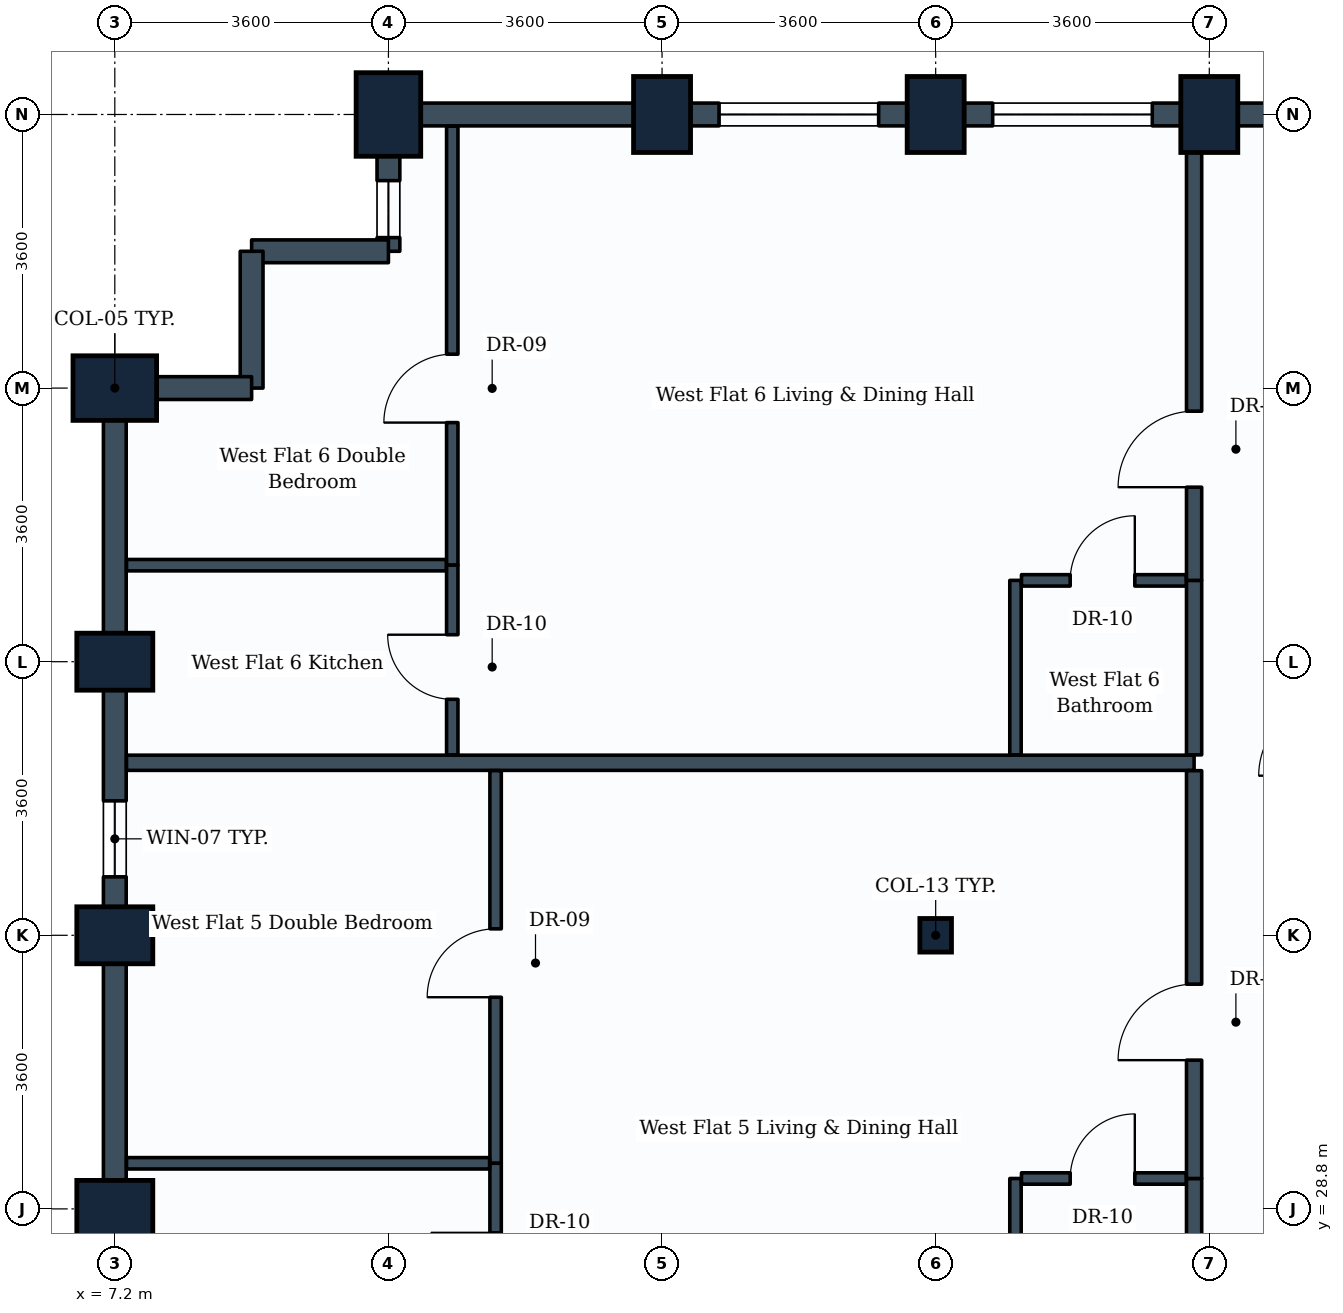
"""IFC4 building model, lengths in metres.
Left out: names, types, materials, properties, quantities, classifications, styles, units other than length and angle.
Written with IfcOpenShell. Run it as: python <this file> out.ifc"""

import sys

from ifc_helpers import new_model, si_unit, direction, frame, frame_2d, origin, origin_2d, place, context, subcontext, project, spatial, rectangle, i_section, extrude, element, fill, save


model = new_model("IFC4")
c1 = context("Model", 3, precision=1e-05, world=origin(), true_north=direction((0.0, 1.0)))
c2 = subcontext(c1, "Body", "Model", "MODEL_VIEW")
j1 = project(units=[si_unit("LENGTHUNIT", "METRE"), si_unit("PLANEANGLEUNIT", "RADIAN")], contexts=[c1])
p1 = place(None, origin())
s1 = spatial("IfcSite", under=j1, at=p1, CompositionType="ELEMENT")
p2 = place(p1, origin())
s2 = spatial("IfcBuilding", under=s1, at=p2, CompositionType="ELEMENT")
p3 = place(p2, frame((0.0, 0.0, 139.0)))
s3 = spatial("IfcBuildingStorey", under=s2, at=p3, CompositionType="ELEMENT", Elevation=139.0)
for number, where, z_axis, x_axis in (
    (1, (7.2, 28.8, 0.0), (0.0, 0.0, 1.0), (0.0, 1.0, 0.0)),
    (2, (7.2, 32.4, 0.0), (0.0, 0.0, 1.0), (0.0, 1.0, 0.0)),
    (3, (7.2, 36.0, 0.0), (0.0, 0.0, 1.0), (0.0, 1.0, 0.0)),
):
    element("IfcColumn", number, at=place(p3, frame(where, z_axis=z_axis, x_axis=x_axis)), inside=s3, PredefinedType="COLUMN", context=c2, shape_type="SweptSolid", body=[
        extrude(rectangle(XDim=0.75, YDim=1.0, at=origin_2d()), origin(), (0.0, 0.0, 1.0), 3.8),
    ])
for number, where, z_axis, x_axis in (
    (4, (7.2, 39.6, 0.0), (0.0, 0.0, 1.0), (0.0, 1.0, 0.0)),
    (5, (10.8, 43.2, 0.0), (0.0, 0.0, 1.0), (1.0, 0.0, 0.0)),
):
    element("IfcColumn", number, at=place(p3, frame(where, z_axis=z_axis, x_axis=x_axis)), inside=s3, PredefinedType="COLUMN", context=c2, shape_type="SweptSolid", body=[
        extrude(rectangle(XDim=0.85, YDim=1.1, at=origin_2d()), origin(), (0.0, 0.0, 1.0), 3.8),
    ])
p4 = place(p3, frame((14.4, 43.2, 0.0), z_axis=(0.0, 0.0, 1.0), x_axis=(1.0, 0.0, 0.0)))
e6 = element("IfcColumn", 6, at=p4, inside=s3, PredefinedType="COLUMN", context=c2, shape_type="SweptSolid", body=[
    extrude(rectangle(XDim=0.75, YDim=1.0, at=origin_2d()), origin(), (0.0, 0.0, 1.0), 3.8),
])
p5 = place(p3, frame((18.0, 32.4, 0.0), z_axis=(0.0, 0.0, 1.0), x_axis=(1.0, 0.0, 0.0)))
e7 = element("IfcColumn", 7, at=p5, inside=s3, PredefinedType="COLUMN", context=c2, shape_type="SweptSolid", body=[
    extrude(i_section(OverallWidth=0.416, OverallDepth=0.442, WebThickness=0.025, FlangeThickness=0.041, FilletRadius=0.015, at=origin_2d()), origin(), (0.0, 0.0, 1.0), 3.8),
])
for number, where, z_axis, x_axis in (
    (8, (18.0, 43.2, 0.0), (0.0, 0.0, 1.0), (1.0, 0.0, 0.0)),
    (9, (21.6, 43.2, 0.0), (0.0, 0.0, 1.0), (1.0, 0.0, 0.0)),
):
    element("IfcColumn", number, at=place(p3, frame(where, z_axis=z_axis, x_axis=x_axis)), inside=s3, PredefinedType="COLUMN", context=c2, shape_type="SweptSolid", body=[
        extrude(rectangle(XDim=0.75, YDim=1.0, at=origin_2d()), origin(), (0.0, 0.0, 1.0), 3.8),
    ])
p6 = place(p3, frame((21.6, 43.2, 0.0), z_axis=(0.0, 0.0, 1.0), x_axis=(1.0, 0.0, 0.0)))
e10 = element("IfcWall", 10, at=p6, inside=s3, PredefinedType="STANDARD", context=c2, shape_type="SweptSolid", body=[
    extrude(rectangle(XDim=3.6, YDim=0.3, at=frame_2d((1.8, 0.0))), origin(), (0.0, 0.0, 1.0), 2.93),
])
p7 = place(p3, frame((18.0, 43.2, 0.0), z_axis=(0.0, 0.0, 1.0), x_axis=(1.0, 0.0, 0.0)))
e11 = element("IfcWall", 11, at=p7, inside=s3, PredefinedType="STANDARD", context=c2, shape_type="SweptSolid", body=[
    extrude(rectangle(XDim=3.6, YDim=0.3, at=frame_2d((1.8, 0.0))), origin(), (0.0, 0.0, 1.0), 2.93),
])
p8 = place(p7, frame((0.75, 0.0, 0.85)))
e12 = element("IfcOpeningElement", 12, at=p8, cuts=e11, PredefinedType="OPENING", context=c2, shape_type="SweptSolid", body=[
    extrude(rectangle(XDim=2.1, YDim=1.35, at=frame_2d((1.05, 0.675))), frame((0.0, 0.16, 0.0), z_axis=(0.0, -1.0, 0.0), x_axis=(1.0, 0.0, 0.0)), (0.0, 0.0, 1.0), 0.32),
])
p9 = place(p3, frame((14.4, 43.2, 0.0), z_axis=(0.0, 0.0, 1.0), x_axis=(1.0, 0.0, 0.0)))
e13 = element("IfcWall", 13, at=p9, inside=s3, PredefinedType="STANDARD", context=c2, shape_type="SweptSolid", body=[
    extrude(rectangle(XDim=3.6, YDim=0.3, at=frame_2d((1.8, 0.0))), origin(), (0.0, 0.0, 1.0), 2.93),
])
p10 = place(p9, frame((0.75, 0.0, 0.85)))
e14 = element("IfcOpeningElement", 14, at=p10, cuts=e13, PredefinedType="OPENING", context=c2, shape_type="SweptSolid", body=[
    extrude(rectangle(XDim=2.1, YDim=1.35, at=frame_2d((1.05, 0.675))), frame((0.0, 0.16, 0.0), z_axis=(0.0, -1.0, 0.0), x_axis=(1.0, 0.0, 0.0)), (0.0, 0.0, 1.0), 0.32),
])
p11 = place(p3, frame((10.8, 43.2, 0.0), z_axis=(0.0, 0.0, 1.0), x_axis=(1.0, 0.0, 0.0)))
e15 = element("IfcWall", 15, at=p11, inside=s3, PredefinedType="STANDARD", context=c2, shape_type="SweptSolid", body=[
    extrude(rectangle(XDim=3.6, YDim=0.3, at=frame_2d((1.8, 0.0))), origin(), (0.0, 0.0, 1.0), 2.93),
])
p12 = place(p3, frame((10.8, 41.4, 0.0), z_axis=(0.0, 0.0, 1.0), x_axis=(0.0, 1.0, 0.0)))
e16 = element("IfcWall", 16, at=p12, inside=s3, PredefinedType="STANDARD", context=c2, shape_type="SweptSolid", body=[
    extrude(rectangle(XDim=1.8, YDim=0.3, at=frame_2d((0.9, 0.0))), origin(), (0.0, 0.0, 1.0), 2.93),
])
p13 = place(p12, frame((0.18, 0.0, 0.85)))
e17 = element("IfcOpeningElement", 17, at=p13, cuts=e16, PredefinedType="OPENING", context=c2, shape_type="SweptSolid", body=[
    extrude(rectangle(XDim=0.75, YDim=1.05, at=frame_2d((0.375, 0.525))), frame((0.0, 0.16, 0.0), z_axis=(0.0, -1.0, 0.0), x_axis=(1.0, 0.0, 0.0)), (0.0, 0.0, 1.0), 0.32),
])
p14 = place(p3, frame((9.0, 41.4, 0.0), z_axis=(0.0, 0.0, 1.0), x_axis=(1.0, 0.0, 0.0)))
e18 = element("IfcWall", 18, at=p14, inside=s3, PredefinedType="STANDARD", context=c2, shape_type="SweptSolid", body=[
    extrude(rectangle(XDim=1.8, YDim=0.3, at=frame_2d((0.9, 0.0))), origin(), (0.0, 0.0, 1.0), 3.535),
])
p15 = place(p3, frame((9.0, 39.6, 0.0), z_axis=(0.0, 0.0, 1.0), x_axis=(0.0, 1.0, 0.0)))
e19 = element("IfcWall", 19, at=p15, inside=s3, PredefinedType="STANDARD", context=c2, shape_type="SweptSolid", body=[
    extrude(rectangle(XDim=1.8, YDim=0.3, at=frame_2d((0.9, 0.0))), origin(), (0.0, 0.0, 1.0), 3.535),
])
p16 = place(p3, frame((7.2, 39.6, 0.0), z_axis=(0.0, 0.0, 1.0), x_axis=(1.0, 0.0, 0.0)))
e20 = element("IfcWall", 20, at=p16, inside=s3, PredefinedType="STANDARD", context=c2, shape_type="SweptSolid", body=[
    extrude(rectangle(XDim=1.8, YDim=0.3, at=frame_2d((0.9, 0.0))), origin(), (0.0, 0.0, 1.0), 2.93),
])
p17 = place(p3, frame((7.2, 36.0, 0.0), z_axis=(0.0, 0.0, 1.0), x_axis=(0.0, 1.0, 0.0)))
e21 = element("IfcWall", 21, at=p17, inside=s3, PredefinedType="STANDARD", context=c2, shape_type="SweptSolid", body=[
    extrude(rectangle(XDim=3.6, YDim=0.3, at=frame_2d((1.8, 0.0))), origin(), (0.0, 0.0, 1.0), 2.93),
])
p18 = place(p3, frame((7.2, 32.4, 0.0), z_axis=(0.0, 0.0, 1.0), x_axis=(0.0, 1.0, 0.0)))
e22 = element("IfcWall", 22, at=p18, inside=s3, PredefinedType="STANDARD", context=c2, shape_type="SweptSolid", body=[
    extrude(rectangle(XDim=3.6, YDim=0.3, at=frame_2d((1.8, 0.0))), origin(), (0.0, 0.0, 1.0), 2.93),
])
p19 = place(p18, frame((0.769, 0.0, 0.85)))
e23 = element("IfcOpeningElement", 23, at=p19, cuts=e22, PredefinedType="OPENING", context=c2, shape_type="SweptSolid", body=[
    extrude(rectangle(XDim=1.0, YDim=1.35, at=frame_2d((0.5, 0.675))), frame((0.0, 0.16, 0.0), z_axis=(0.0, -1.0, 0.0), x_axis=(1.0, 0.0, 0.0)), (0.0, 0.0, 1.0), 0.32),
])
p20 = place(p3, frame((7.2, 28.8, 0.0), z_axis=(0.0, 0.0, 1.0), x_axis=(0.0, 1.0, 0.0)))
e24 = element("IfcWall", 24, at=p20, inside=s3, PredefinedType="STANDARD", context=c2, shape_type="SweptSolid", body=[
    extrude(rectangle(XDim=3.6, YDim=0.3, at=frame_2d((1.8, 0.0))), origin(), (0.0, 0.0, 1.0), 2.93),
])
p21 = place(p3, frame((7.2, 25.2, 0.0), z_axis=(0.0, 0.0, 1.0), x_axis=(0.0, 1.0, 0.0)))
e25 = element("IfcWall", 25, at=p21, inside=s3, PredefinedType="STANDARD", context=c2, shape_type="SweptSolid", body=[
    extrude(rectangle(XDim=3.6, YDim=0.3, at=frame_2d((1.8, 0.0))), origin(), (0.0, 0.0, 1.0), 2.93),
])
p22 = place(p3, frame((7.354, 34.67, 0.0), z_axis=(0.0, 0.0, 1.0), x_axis=(1.0, 0.0, 0.0)))
e26 = element("IfcWall", 26, at=p22, inside=s3, PredefinedType="PARTITIONING", context=c2, shape_type="SweptSolid", body=[
    extrude(rectangle(XDim=14.046, YDim=0.2, at=frame_2d((7.023, 0.0))), origin(), (0.0, 0.0, 1.0), 2.93),
])
p23 = place(p3, frame((21.4, 26.904, 0.0), z_axis=(0.0, 0.0, 1.0), x_axis=(0.0, 1.0, 0.0)))
e27 = element("IfcWall", 27, at=p23, inside=s3, PredefinedType="PARTITIONING", context=c2, shape_type="SweptSolid", body=[
    extrude(rectangle(XDim=2.296, YDim=0.2, at=frame_2d((1.148, 0.0))), origin(), (0.0, 0.0, 1.0), 3.13),
])
p24 = place(p3, frame((19.05, 26.904, 0.0), z_axis=(0.0, 0.0, 1.0), x_axis=(0.0, 1.0, 0.0)))
e28 = element("IfcWall", 28, at=p24, inside=s3, PredefinedType="PARTITIONING", context=c2, shape_type="SweptSolid", body=[
    extrude(rectangle(XDim=2.296, YDim=0.15, at=frame_2d((1.148, 0.0))), origin(), (0.0, 0.0, 1.0), 3.17),
])
p25 = place(p3, frame((19.129, 29.2, 0.0), z_axis=(0.0, 0.0, 1.0), x_axis=(1.0, 0.0, 0.0)))
e29 = element("IfcWall", 29, at=p25, inside=s3, PredefinedType="PARTITIONING", context=c2, shape_type="SweptSolid", body=[
    extrude(rectangle(XDim=2.167, YDim=0.15, at=frame_2d((1.083, 0.0))), origin(), (0.0, 0.0, 1.0), 3.535),
])
p26 = place(p25, frame((0.641, 0.0, 0.0)))
e30 = element("IfcOpeningElement", 30, at=p26, cuts=e29, PredefinedType="OPENING", context=c2, shape_type="SweptSolid", body=[
    extrude(rectangle(XDim=0.85, YDim=2.1, at=frame_2d((0.425, 1.05))), frame((0.0, 0.085, 0.0), z_axis=(0.0, -1.0, 0.0), x_axis=(1.0, 0.0, 0.0)), (0.0, 0.0, 1.0), 0.17),
])
p27 = place(p3, frame((21.4, 29.2, 0.0), z_axis=(0.0, 0.0, 1.0), x_axis=(0.0, 1.0, 0.0)))
e31 = element("IfcWall", 31, at=p27, inside=s3, PredefinedType="PARTITIONING", context=c2, shape_type="SweptSolid", body=[
    extrude(rectangle(XDim=5.366, YDim=0.2, at=frame_2d((2.683, 0.0))), origin(), (0.0, 0.0, 1.0), 3.13),
])
p28 = place(p27, frame((1.557, 0.0, 0.0)))
e32 = element("IfcOpeningElement", 32, at=p28, cuts=e31, PredefinedType="OPENING", context=c2, shape_type="SweptSolid", body=[
    extrude(rectangle(XDim=1.0, YDim=2.1, at=frame_2d((0.5, 1.05))), frame((0.0, 0.11, 0.0), z_axis=(0.0, -1.0, 0.0), x_axis=(1.0, 0.0, 0.0)), (0.0, 0.0, 1.0), 0.22),
])
p29 = place(p3, frame((12.21, 29.4, 0.0), z_axis=(0.0, 0.0, 1.0), x_axis=(0.0, 1.0, 0.0)))
e33 = element("IfcWall", 33, at=p29, inside=s3, PredefinedType="PARTITIONING", context=c2, shape_type="SweptSolid", body=[
    extrude(rectangle(XDim=5.166, YDim=0.15, at=frame_2d((2.583, 0.0))), origin(), (0.0, 0.0, 1.0), 3.18),
])
p30 = place(p29, frame((2.185, 0.0, 0.0)))
e34 = element("IfcOpeningElement", 34, at=p30, cuts=e33, PredefinedType="OPENING", context=c2, shape_type="SweptSolid", body=[
    extrude(rectangle(XDim=0.9, YDim=2.1, at=frame_2d((0.45, 1.05))), frame((0.0, 0.085, 0.0), z_axis=(0.0, -1.0, 0.0), x_axis=(1.0, 0.0, 0.0)), (0.0, 0.0, 1.0), 0.17),
])
p31 = place(p3, frame((12.21, 26.904, 0.0), z_axis=(0.0, 0.0, 1.0), x_axis=(0.0, 1.0, 0.0)))
e35 = element("IfcWall", 35, at=p31, inside=s3, PredefinedType="PARTITIONING", context=c2, shape_type="SweptSolid", body=[
    extrude(rectangle(XDim=2.496, YDim=0.15, at=frame_2d((1.248, 0.0))), origin(), (0.0, 0.0, 1.0), 3.17),
])
p32 = place(p31, frame((0.731, 0.0, 0.0)))
e36 = element("IfcOpeningElement", 36, at=p32, cuts=e35, PredefinedType="OPENING", context=c2, shape_type="SweptSolid", body=[
    extrude(rectangle(XDim=0.85, YDim=2.1, at=frame_2d((0.425, 1.05))), frame((0.0, 0.085, 0.0), z_axis=(0.0, -1.0, 0.0), x_axis=(1.0, 0.0, 0.0)), (0.0, 0.0, 1.0), 0.17),
])
p33 = place(p3, frame((7.354, 29.4, 0.0), z_axis=(0.0, 0.0, 1.0), x_axis=(1.0, 0.0, 0.0)))
e37 = element("IfcWall", 37, at=p33, inside=s3, PredefinedType="PARTITIONING", context=c2, shape_type="SweptSolid", body=[
    extrude(rectangle(XDim=4.777, YDim=0.15, at=frame_2d((2.389, 0.0))), origin(), (0.0, 0.0, 1.0), 2.93),
])
p34 = place(p3, frame((21.4, 34.774, 0.0), z_axis=(0.0, 0.0, 1.0), x_axis=(0.0, 1.0, 0.0)))
e38 = element("IfcWall", 38, at=p34, inside=s3, PredefinedType="PARTITIONING", context=c2, shape_type="SweptSolid", body=[
    extrude(rectangle(XDim=2.296, YDim=0.2, at=frame_2d((1.148, 0.0))), origin(), (0.0, 0.0, 1.0), 3.17),
])
p35 = place(p3, frame((19.05, 34.774, 0.0), z_axis=(0.0, 0.0, 1.0), x_axis=(0.0, 1.0, 0.0)))
e39 = element("IfcWall", 39, at=p35, inside=s3, PredefinedType="PARTITIONING", context=c2, shape_type="SweptSolid", body=[
    extrude(rectangle(XDim=2.296, YDim=0.15, at=frame_2d((1.148, 0.0))), origin(), (0.0, 0.0, 1.0), 3.17),
])
p36 = place(p3, frame((19.129, 37.07, 0.0), z_axis=(0.0, 0.0, 1.0), x_axis=(1.0, 0.0, 0.0)))
e40 = element("IfcWall", 40, at=p36, inside=s3, PredefinedType="PARTITIONING", context=c2, shape_type="SweptSolid", body=[
    extrude(rectangle(XDim=2.167, YDim=0.15, at=frame_2d((1.083, 0.0))), origin(), (0.0, 0.0, 1.0), 3.535),
])
p37 = place(p36, frame((0.641, 0.0, 0.0)))
e41 = element("IfcOpeningElement", 41, at=p37, cuts=e40, PredefinedType="OPENING", context=c2, shape_type="SweptSolid", body=[
    extrude(rectangle(XDim=0.85, YDim=2.1, at=frame_2d((0.425, 1.05))), frame((0.0, 0.085, 0.0), z_axis=(0.0, -1.0, 0.0), x_axis=(1.0, 0.0, 0.0)), (0.0, 0.0, 1.0), 0.17),
])
p38 = place(p3, frame((21.4, 37.07, 0.0), z_axis=(0.0, 0.0, 1.0), x_axis=(0.0, 1.0, 0.0)))
e42 = element("IfcWall", 42, at=p38, inside=s3, PredefinedType="PARTITIONING", context=c2, shape_type="SweptSolid", body=[
    extrude(rectangle(XDim=5.976, YDim=0.2, at=frame_2d((2.988, 0.0))), origin(), (0.0, 0.0, 1.0), 2.93),
])
p39 = place(p38, frame((1.226, 0.0, 0.0)))
e43 = element("IfcOpeningElement", 43, at=p39, cuts=e42, PredefinedType="OPENING", context=c2, shape_type="SweptSolid", body=[
    extrude(rectangle(XDim=1.0, YDim=2.1, at=frame_2d((0.5, 1.05))), frame((0.0, 0.11, 0.0), z_axis=(0.0, -1.0, 0.0), x_axis=(1.0, 0.0, 0.0)), (0.0, 0.0, 1.0), 0.22),
])
p40 = place(p3, frame((11.64, 37.27, 0.0), z_axis=(0.0, 0.0, 1.0), x_axis=(0.0, 1.0, 0.0)))
e44 = element("IfcWall", 44, at=p40, inside=s3, PredefinedType="PARTITIONING", context=c2, shape_type="SweptSolid", body=[
    extrude(rectangle(XDim=5.776, YDim=0.15, at=frame_2d((2.888, 0.0))), origin(), (0.0, 0.0, 1.0), 2.93),
])
p41 = place(p40, frame((1.876, 0.0, 0.0)))
e45 = element("IfcOpeningElement", 45, at=p41, cuts=e44, PredefinedType="OPENING", context=c2, shape_type="SweptSolid", body=[
    extrude(rectangle(XDim=0.9, YDim=2.1, at=frame_2d((0.45, 1.05))), frame((0.0, 0.085, 0.0), z_axis=(0.0, -1.0, 0.0), x_axis=(1.0, 0.0, 0.0)), (0.0, 0.0, 1.0), 0.17),
])
p42 = place(p3, frame((11.64, 34.774, 0.0), z_axis=(0.0, 0.0, 1.0), x_axis=(0.0, 1.0, 0.0)))
e46 = element("IfcWall", 46, at=p42, inside=s3, PredefinedType="PARTITIONING", context=c2, shape_type="SweptSolid", body=[
    extrude(rectangle(XDim=2.496, YDim=0.15, at=frame_2d((1.248, 0.0))), origin(), (0.0, 0.0, 1.0), 3.17),
])
p43 = place(p42, frame((0.731, 0.0, 0.0)))
e47 = element("IfcOpeningElement", 47, at=p43, cuts=e46, PredefinedType="OPENING", context=c2, shape_type="SweptSolid", body=[
    extrude(rectangle(XDim=0.85, YDim=2.1, at=frame_2d((0.425, 1.05))), frame((0.0, 0.085, 0.0), z_axis=(0.0, -1.0, 0.0), x_axis=(1.0, 0.0, 0.0)), (0.0, 0.0, 1.0), 0.17),
])
p44 = place(p3, frame((7.354, 37.27, 0.0), z_axis=(0.0, 0.0, 1.0), x_axis=(1.0, 0.0, 0.0)))
e48 = element("IfcWall", 48, at=p44, inside=s3, PredefinedType="PARTITIONING", context=c2, shape_type="SweptSolid", body=[
    extrude(rectangle(XDim=4.207, YDim=0.15, at=frame_2d((2.104, 0.0))), origin(), (0.0, 0.0, 1.0), 2.93),
])
p45 = place(p8, origin())
e49 = element("IfcWindow", 49, at=p45, inside=s3, PartitioningType="SINGLE_PANEL", PredefinedType="WINDOW", context=c2, shape_type="SweptSolid", body=[
    extrude(rectangle(XDim=2.1, YDim=1.35, at=frame_2d((1.05, 0.675))), frame((0.0, 0.03, 0.0), z_axis=(0.0, -1.0, 0.0), x_axis=(1.0, 0.0, 0.0)), (0.0, 0.0, 1.0), 0.06),
])
fill(e12, e49)
p46 = place(p10, origin())
e50 = element("IfcWindow", 50, at=p46, inside=s3, PartitioningType="SINGLE_PANEL", PredefinedType="WINDOW", context=c2, shape_type="SweptSolid", body=[
    extrude(rectangle(XDim=2.1, YDim=1.35, at=frame_2d((1.05, 0.675))), frame((0.0, 0.03, 0.0), z_axis=(0.0, -1.0, 0.0), x_axis=(1.0, 0.0, 0.0)), (0.0, 0.0, 1.0), 0.06),
])
fill(e14, e50)
p47 = place(p26, origin())
e51 = element("IfcDoor", 51, at=p47, inside=s3, OperationType="SINGLE_SWING_RIGHT", PredefinedType="DOOR", context=c2, shape_type="SweptSolid", body=[
    extrude(rectangle(XDim=0.85, YDim=2.1, at=frame_2d((0.425, 1.05))), frame((0.0, 0.025, 0.0), z_axis=(0.0, -1.0, 0.0), x_axis=(1.0, 0.0, 0.0)), (0.0, 0.0, 1.0), 0.05),
])
fill(e30, e51)
p48 = place(p28, origin())
e52 = element("IfcDoor", 52, at=p48, inside=s3, OperationType="SINGLE_SWING_LEFT", PredefinedType="DOOR", context=c2, shape_type="SweptSolid", body=[
    extrude(rectangle(XDim=1.0, YDim=2.1, at=frame_2d((0.5, 1.05))), frame((0.0, 0.025, 0.0), z_axis=(0.0, -1.0, 0.0), x_axis=(1.0, 0.0, 0.0)), (0.0, 0.0, 1.0), 0.05),
])
fill(e32, e52)
p49 = place(p30, origin())
e53 = element("IfcDoor", 53, at=p49, inside=s3, OperationType="SINGLE_SWING_LEFT", PredefinedType="DOOR", context=c2, shape_type="SweptSolid", body=[
    extrude(rectangle(XDim=0.9, YDim=2.1, at=frame_2d((0.45, 1.05))), frame((0.0, 0.025, 0.0), z_axis=(0.0, -1.0, 0.0), x_axis=(1.0, 0.0, 0.0)), (0.0, 0.0, 1.0), 0.05),
])
fill(e34, e53)
p50 = place(p32, origin())
e54 = element("IfcDoor", 54, at=p50, inside=s3, OperationType="SINGLE_SWING_RIGHT", PredefinedType="DOOR", context=c2, shape_type="SweptSolid", body=[
    extrude(rectangle(XDim=0.85, YDim=2.1, at=frame_2d((0.425, 1.05))), frame((0.0, 0.025, 0.0), z_axis=(0.0, -1.0, 0.0), x_axis=(1.0, 0.0, 0.0)), (0.0, 0.0, 1.0), 0.05),
])
fill(e36, e54)
p51 = place(p37, origin())
e55 = element("IfcDoor", 55, at=p51, inside=s3, OperationType="SINGLE_SWING_RIGHT", PredefinedType="DOOR", context=c2, shape_type="SweptSolid", body=[
    extrude(rectangle(XDim=0.85, YDim=2.1, at=frame_2d((0.425, 1.05))), frame((0.0, 0.025, 0.0), z_axis=(0.0, -1.0, 0.0), x_axis=(1.0, 0.0, 0.0)), (0.0, 0.0, 1.0), 0.05),
])
fill(e41, e55)
p52 = place(p39, origin())
e56 = element("IfcDoor", 56, at=p52, inside=s3, OperationType="SINGLE_SWING_LEFT", PredefinedType="DOOR", context=c2, shape_type="SweptSolid", body=[
    extrude(rectangle(XDim=1.0, YDim=2.1, at=frame_2d((0.5, 1.05))), frame((0.0, 0.025, 0.0), z_axis=(0.0, -1.0, 0.0), x_axis=(1.0, 0.0, 0.0)), (0.0, 0.0, 1.0), 0.05),
])
fill(e43, e56)
p53 = place(p41, origin())
e57 = element("IfcDoor", 57, at=p53, inside=s3, OperationType="SINGLE_SWING_LEFT", PredefinedType="DOOR", context=c2, shape_type="SweptSolid", body=[
    extrude(rectangle(XDim=0.9, YDim=2.1, at=frame_2d((0.45, 1.05))), frame((0.0, 0.025, 0.0), z_axis=(0.0, -1.0, 0.0), x_axis=(1.0, 0.0, 0.0)), (0.0, 0.0, 1.0), 0.05),
])
fill(e45, e57)
p54 = place(p43, origin())
e58 = element("IfcDoor", 58, at=p54, inside=s3, OperationType="SINGLE_SWING_RIGHT", PredefinedType="DOOR", context=c2, shape_type="SweptSolid", body=[
    extrude(rectangle(XDim=0.85, YDim=2.1, at=frame_2d((0.425, 1.05))), frame((0.0, 0.025, 0.0), z_axis=(0.0, -1.0, 0.0), x_axis=(1.0, 0.0, 0.0)), (0.0, 0.0, 1.0), 0.05),
])
fill(e47, e58)
p55 = place(p19, origin())
e59 = element("IfcWindow", 59, at=p55, inside=s3, PartitioningType="SINGLE_PANEL", PredefinedType="WINDOW", context=c2, shape_type="SweptSolid", body=[
    extrude(rectangle(XDim=1.0, YDim=1.35, at=frame_2d((0.5, 0.675))), frame((0.0, 0.03, 0.0), z_axis=(0.0, -1.0, 0.0), x_axis=(1.0, 0.0, 0.0)), (0.0, 0.0, 1.0), 0.06),
])
fill(e23, e59)
p56 = place(p13, origin())
e60 = element("IfcWindow", 60, at=p56, inside=s3, PartitioningType="SINGLE_PANEL", PredefinedType="WINDOW", context=c2, shape_type="SweptSolid", body=[
    extrude(rectangle(XDim=0.75, YDim=1.05, at=frame_2d((0.375, 0.525))), frame((0.0, 0.03, 0.0), z_axis=(0.0, -1.0, 0.0), x_axis=(1.0, 0.0, 0.0)), (0.0, 0.0, 1.0), 0.06),
])
fill(e17, e60)
save(model, sys.argv[1])
